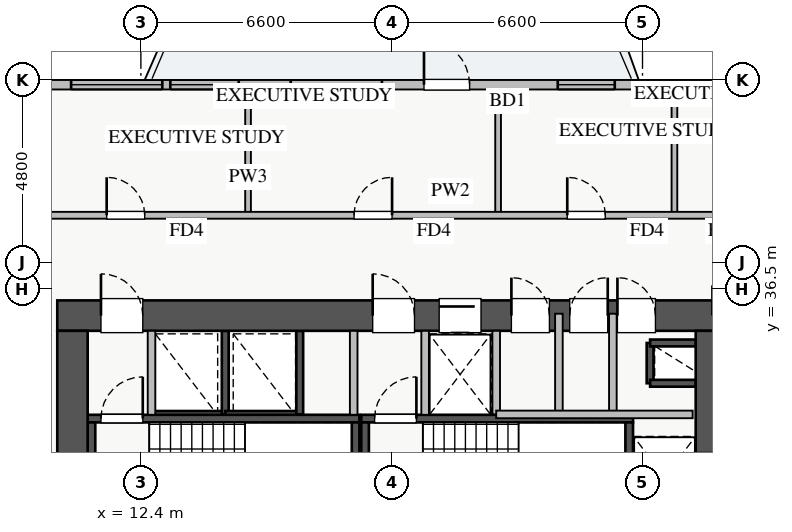
"""IFC4 building model, lengths in metres.
Left out: names, types, materials, properties, quantities, classifications, styles, units other than length and angle.
Written with IfcOpenShell. Run it as: python <this file> out.ifc"""

import sys

from ifc_helpers import new_model, si_unit, direction, frame, frame_2d, origin, place, context, subcontext, project, spatial, rectangle, extrude, source, transform, mapped, element, fill, save


model = new_model("IFC4")
c1 = context("Model", 3, precision=1e-05, world=origin(), true_north=direction((0.0, 1.0)))
c2 = subcontext(c1, "Body", "Model", "MODEL_VIEW")
j1 = project(units=[si_unit("LENGTHUNIT", "METRE"), si_unit("PLANEANGLEUNIT", "RADIAN")], contexts=[c1])
p1 = place(None, origin())
s1 = spatial("IfcSite", under=j1, at=p1, CompositionType="ELEMENT")
p2 = place(p1, origin())
s2 = spatial("IfcBuilding", under=s1, at=p2, CompositionType="ELEMENT")
p3 = place(p2, frame((0.0, 0.0, 73.0)))
s3 = spatial("IfcBuildingStorey", under=s2, at=p3, CompositionType="ELEMENT", Elevation=73.0)
p4 = place(p3, frame((12.68, 33.2, 0.0), z_axis=(0.0, 0.0, 1.0), x_axis=(1.0, 0.0, 0.0)))
e1 = element("IfcWall", 1, at=p4, inside=s3, PredefinedType="SHEAR", context=c2, shape_type="SweptSolid", body=[
    extrude(rectangle(XDim=1.94, YDim=0.18, at=frame_2d((0.97, 0.0))), origin(), (0.0, 0.0, 1.0), 3.07),
])
p5 = place(p3, frame((14.62, 33.2, 0.0), z_axis=(0.0, 0.0, 1.0), x_axis=(0.0, 1.0, 0.0)))
e2 = element("IfcWall", 2, at=p5, inside=s3, PredefinedType="SHEAR", context=c2, shape_type="SweptSolid", body=[
    extrude(rectangle(XDim=2.2, YDim=0.18, at=frame_2d((1.1, 0.0))), origin(), (0.0, 0.0, 1.0), 3.07),
])
p6 = place(p3, frame((25.8, 34.02, 0.0), z_axis=(0.0, 0.0, 1.0), x_axis=(0.0, 1.0, 0.0)))
e3 = element("IfcWall", 3, at=p6, inside=s3, PredefinedType="SHEAR", context=c2, shape_type="SweptSolid", body=[
    extrude(rectangle(XDim=1.06, YDim=0.18, at=frame_2d((0.53, 0.0))), origin(), (0.0, 0.0, 1.0), 3.07),
])
for number, where, z_axis, x_axis in (
    (4, (25.8, 35.08, 0.0), (0.0, 0.0, 1.0), (1.0, 0.0, 0.0)),
    (5, (25.8, 34.02, 0.0), (0.0, 0.0, 1.0), (1.0, 0.0, 0.0)),
):
    element("IfcWall", number, at=place(p3, frame(where, z_axis=z_axis, x_axis=x_axis)), inside=s3, PredefinedType="SHEAR", context=c2, shape_type="SweptSolid", body=[
        extrude(rectangle(XDim=1.2, YDim=0.18, at=frame_2d((0.6, 0.0))), origin(), (0.0, 0.0, 1.0), 3.07),
    ])
p7 = place(p3, frame((14.62, 33.2, 0.0), z_axis=(0.0, 0.0, 1.0), x_axis=(1.0, 0.0, 0.0)))
e6 = element("IfcWall", 6, at=p7, inside=s3, PredefinedType="SHEAR", context=c2, shape_type="SweptSolid", body=[
    extrude(rectangle(XDim=1.96, YDim=0.18, at=frame_2d((0.98, 0.0))), origin(), (0.0, 0.0, 1.0), 3.07),
])
p8 = place(p3, frame((16.58, 33.2, 0.0), z_axis=(0.0, 0.0, 1.0), x_axis=(0.0, 1.0, 0.0)))
e7 = element("IfcWall", 7, at=p8, inside=s3, PredefinedType="SHEAR", context=c2, shape_type="SweptSolid", body=[
    extrude(rectangle(XDim=2.2, YDim=0.18, at=frame_2d((1.1, 0.0))), origin(), (0.0, 0.0, 1.0), 3.07),
])
p9 = place(p3, frame((19.88, 33.2, 0.0), z_axis=(0.0, 0.0, 1.0), x_axis=(1.0, 0.0, 0.0)))
e8 = element("IfcWall", 8, at=p9, inside=s3, PredefinedType="SHEAR", context=c2, shape_type="SweptSolid", body=[
    extrude(rectangle(XDim=1.87, YDim=0.18, at=frame_2d((0.935, 0.0))), origin(), (0.0, 0.0, 1.0), 3.07),
])
p10 = place(p3, frame((11.0, 33.09, 0.0), z_axis=(0.0, 0.0, 1.0), x_axis=(1.0, 0.0, 0.0)))
e9 = element("IfcWall", 9, at=p10, inside=s3, PredefinedType="SHEAR", context=c2, shape_type="SweptSolid", body=[
    extrude(rectangle(XDim=7.15, YDim=0.2, at=frame_2d((3.575, 0.0))), origin(), (0.0, 0.0, 1.0), 3.25),
])
p11 = place(p10, frame((0.35, 0.0, 0.0)))
e10 = element("IfcOpeningElement", 10, at=p11, cuts=e9, PredefinedType="OPENING", context=c2, shape_type="SweptSolid", body=[
    extrude(rectangle(XDim=1.1, YDim=2.05, at=frame_2d((0.55, 1.025))), frame((0.0, 0.11, 0.0), z_axis=(0.0, -1.0, 0.0), x_axis=(1.0, 0.0, 0.0)), (0.0, 0.0, 1.0), 0.22),
])
for number, where, z_axis, x_axis in (
    (11, (11.1, 30.05, 0.0), (0.0, 0.0, 1.0), (0.0, 1.0, 0.0)),
    (12, (18.05, 30.05, 0.0), (0.0, 0.0, 1.0), (0.0, 1.0, 0.0)),
):
    element("IfcWall", number, at=place(p3, frame(where, z_axis=z_axis, x_axis=x_axis)), inside=s3, PredefinedType="SHEAR", context=c2, shape_type="SweptSolid", body=[
        extrude(rectangle(XDim=2.94, YDim=0.2, at=frame_2d((1.47, 0.0))), origin(), (0.0, 0.0, 1.0), 3.25),
    ])
p12 = place(p3, frame((18.2, 33.09, 0.0), z_axis=(0.0, 0.0, 1.0), x_axis=(1.0, 0.0, 0.0)))
e13 = element("IfcWall", 13, at=p12, inside=s3, PredefinedType="SHEAR", context=c2, shape_type="SweptSolid", body=[
    extrude(rectangle(XDim=7.15, YDim=0.2, at=frame_2d((3.575, 0.0))), origin(), (0.0, 0.0, 1.0), 3.25),
])
p13 = place(p12, frame((0.35, 0.0, 0.0)))
e14 = element("IfcOpeningElement", 14, at=p13, cuts=e13, PredefinedType="OPENING", context=c2, shape_type="SweptSolid", body=[
    extrude(rectangle(XDim=1.1, YDim=2.05, at=frame_2d((0.55, 1.025))), frame((0.0, 0.11, 0.0), z_axis=(0.0, -1.0, 0.0), x_axis=(1.0, 0.0, 0.0)), (0.0, 0.0, 1.0), 0.22),
])
for number, where, z_axis, x_axis in (
    (15, (18.3, 30.05, 0.0), (0.0, 0.0, 1.0), (0.0, 1.0, 0.0)),
    (16, (25.25, 30.05, 0.0), (0.0, 0.0, 1.0), (0.0, 1.0, 0.0)),
):
    element("IfcWall", number, at=place(p3, frame(where, z_axis=z_axis, x_axis=x_axis)), inside=s3, PredefinedType="SHEAR", context=c2, shape_type="SweptSolid", body=[
        extrude(rectangle(XDim=2.94, YDim=0.2, at=frame_2d((1.47, 0.0))), origin(), (0.0, 0.0, 1.0), 3.25),
    ])
p14 = place(p3, frame((10.2, 35.8, 0.0), z_axis=(0.0, 0.0, 1.0), x_axis=(1.0, 0.0, 0.0)))
e17 = element("IfcWall", 17, at=p14, inside=s3, PredefinedType="SHEAR", context=c2, shape_type="SweptSolid", body=[
    extrude(rectangle(XDim=17.6, YDim=0.8, at=frame_2d((8.8, 0.0))), origin(), (0.0, 0.0, 1.0), 3.25),
])
p15 = place(p14, frame((1.15, 0.0, 0.0)))
e18 = element("IfcOpeningElement", 18, at=p15, cuts=e17, PredefinedType="OPENING", context=c2, shape_type="SweptSolid", body=[
    extrude(rectangle(XDim=1.1, YDim=2.05, at=frame_2d((0.55, 1.025))), frame((0.0, 0.41, 0.0), z_axis=(0.0, -1.0, 0.0), x_axis=(1.0, 0.0, 0.0)), (0.0, 0.0, 1.0), 0.82),
])
p16 = place(p14, frame((8.3, 0.0, 0.0)))
e19 = element("IfcOpeningElement", 19, at=p16, cuts=e17, PredefinedType="OPENING", context=c2, shape_type="SweptSolid", body=[
    extrude(rectangle(XDim=1.1, YDim=2.05, at=frame_2d((0.55, 1.025))), frame((0.0, 0.41, 0.0), z_axis=(0.0, -1.0, 0.0), x_axis=(1.0, 0.0, 0.0)), (0.0, 0.0, 1.0), 0.82),
])
p17 = place(p14, frame((10.05, 0.0, 0.0)))
e20 = element("IfcOpeningElement", 20, at=p17, cuts=e17, PredefinedType="OPENING", context=c2, shape_type="SweptSolid", body=[
    extrude(rectangle(XDim=1.1, YDim=2.05, at=frame_2d((0.55, 1.025))), frame((0.0, 0.41, 0.0), z_axis=(0.0, -1.0, 0.0), x_axis=(1.0, 0.0, 0.0)), (0.0, 0.0, 1.0), 0.82),
])
p18 = place(p14, frame((14.74, 0.0, 0.0)))
e21 = element("IfcOpeningElement", 21, at=p18, cuts=e17, PredefinedType="OPENING", context=c2, shape_type="SweptSolid", body=[
    extrude(rectangle(XDim=1.0, YDim=2.05, at=frame_2d((0.5, 1.025))), frame((0.0, 0.41, 0.0), z_axis=(0.0, -1.0, 0.0), x_axis=(1.0, 0.0, 0.0)), (0.0, 0.0, 1.0), 0.82),
])
p19 = place(p14, frame((11.95, 0.0, 0.0)))
e22 = element("IfcOpeningElement", 22, at=p19, cuts=e17, PredefinedType="OPENING", context=c2, shape_type="SweptSolid", body=[
    extrude(rectangle(XDim=1.0, YDim=2.05, at=frame_2d((0.5, 1.025))), frame((0.0, 0.41, 0.0), z_axis=(0.0, -1.0, 0.0), x_axis=(1.0, 0.0, 0.0)), (0.0, 0.0, 1.0), 0.82),
])
p20 = place(p14, frame((13.485, 0.0, 0.0)))
e23 = element("IfcOpeningElement", 23, at=p20, cuts=e17, PredefinedType="OPENING", context=c2, shape_type="SweptSolid", body=[
    extrude(rectangle(XDim=1.0, YDim=2.05, at=frame_2d((0.5, 1.025))), frame((0.0, 0.41, 0.0), z_axis=(0.0, -1.0, 0.0), x_axis=(1.0, 0.0, 0.0)), (0.0, 0.0, 1.0), 0.82),
])
p21 = place(p3, frame((10.6, 29.8, 0.0), z_axis=(0.0, 0.0, 1.0), x_axis=(0.0, 1.0, 0.0)))
e24 = element("IfcWall", 24, at=p21, inside=s3, PredefinedType="SHEAR", context=c2, shape_type="SweptSolid", body=[
    extrude(rectangle(XDim=5.6, YDim=0.8, at=frame_2d((2.8, 0.0))), origin(), (0.0, 0.0, 1.0), 3.25),
])
p22 = place(p3, frame((27.4, 29.8, 0.0), z_axis=(0.0, 0.0, 1.0), x_axis=(0.0, 1.0, 0.0)))
e25 = element("IfcWall", 25, at=p22, inside=s3, PredefinedType="SHEAR", context=c2, shape_type="SweptSolid", body=[
    extrude(rectangle(XDim=5.6, YDim=0.8, at=frame_2d((2.8, 0.0))), origin(), (0.0, 0.0, 1.0), 3.25),
])
p23 = place(p22, frame((1.1, 0.0, 0.0)))
e26 = element("IfcOpeningElement", 26, at=p23, cuts=e25, PredefinedType="OPENING", context=c2, shape_type="SweptSolid", body=[
    extrude(rectangle(XDim=1.3, YDim=2.05, at=frame_2d((0.65, 1.025))), frame((0.0, 0.41, 0.0), z_axis=(0.0, -1.0, 0.0), x_axis=(1.0, 0.0, 0.0)), (0.0, 0.0, 1.0), 0.82),
])
p24 = place(p3, frame((5.45, 41.875, 0.0), z_axis=(0.0, 0.0, 1.0), x_axis=(1.0, 0.0, 0.0)))
e27 = element("IfcWall", 27, at=p24, inside=s3, PredefinedType="STANDARD", context=c2, shape_type="SweptSolid", body=[
    extrude(rectangle(XDim=27.1, YDim=0.25, at=frame_2d((13.55, 0.0))), origin(), (0.0, 0.0, 1.0), 2.61),
])
p25 = place(p24, frame((14.4, 0.0, 0.0)))
e28 = element("IfcOpeningElement", 28, at=p25, cuts=e27, PredefinedType="OPENING", context=c2, shape_type="SweptSolid", body=[
    extrude(rectangle(XDim=1.2, YDim=2.1, at=frame_2d((0.6, 1.05))), frame((0.0, 0.135, 0.0), z_axis=(0.0, -1.0, 0.0), x_axis=(1.0, 0.0, 0.0)), (0.0, 0.0, 1.0), 0.27),
])
p26 = place(p24, frame((1.48, 0.0, 0.9)))
e29 = element("IfcOpeningElement", 29, at=p26, cuts=e27, PredefinedType="OPENING", context=c2, shape_type="SweptSolid", body=[
    extrude(rectangle(XDim=1.5, YDim=1.5, at=frame_2d((0.75, 0.75))), frame((0.0, 0.135, 0.0), z_axis=(0.0, -1.0, 0.0), x_axis=(1.0, 0.0, 0.0)), (0.0, 0.0, 1.0), 0.27),
])
p27 = place(p24, frame((7.725, 0.0, 0.9)))
e30 = element("IfcOpeningElement", 30, at=p27, cuts=e27, PredefinedType="OPENING", context=c2, shape_type="SweptSolid", body=[
    extrude(rectangle(XDim=1.8, YDim=1.5, at=frame_2d((0.9, 0.75))), frame((0.0, 0.135, 0.0), z_axis=(0.0, -1.0, 0.0), x_axis=(1.0, 0.0, 0.0)), (0.0, 0.0, 1.0), 0.27),
])
p28 = place(p24, frame((17.92, 0.0, 0.9)))
e31 = element("IfcOpeningElement", 31, at=p28, cuts=e27, PredefinedType="OPENING", context=c2, shape_type="SweptSolid", body=[
    extrude(rectangle(XDim=1.5, YDim=1.5, at=frame_2d((0.75, 0.75))), frame((0.0, 0.135, 0.0), z_axis=(0.0, -1.0, 0.0), x_axis=(1.0, 0.0, 0.0)), (0.0, 0.0, 1.0), 0.27),
])
p29 = place(p24, frame((22.663, 0.0, 0.9)))
e32 = element("IfcOpeningElement", 32, at=p29, cuts=e27, PredefinedType="OPENING", context=c2, shape_type="SweptSolid", body=[
    extrude(rectangle(XDim=2.1, YDim=1.48, at=frame_2d((1.05, 0.74))), frame((0.0, 0.135, 0.0), z_axis=(0.0, -1.0, 0.0), x_axis=(1.0, 0.0, 0.0)), (0.0, 0.0, 1.0), 0.27),
])
p30 = place(p24, frame((5.114, 0.0, 0.9)))
e33 = element("IfcOpeningElement", 33, at=p30, cuts=e27, PredefinedType="OPENING", context=c2, shape_type="SweptSolid", body=[
    extrude(rectangle(XDim=2.4, YDim=1.5, at=frame_2d((1.2, 0.75))), frame((0.0, 0.135, 0.0), z_axis=(0.0, -1.0, 0.0), x_axis=(1.0, 0.0, 0.0)), (0.0, 0.0, 1.0), 0.27),
])
p31 = place(p24, frame((10.893, 0.0, 0.9)))
e34 = element("IfcOpeningElement", 34, at=p31, cuts=e27, PredefinedType="OPENING", context=c2, shape_type="SweptSolid", body=[
    extrude(rectangle(XDim=2.4, YDim=1.5, at=frame_2d((1.2, 0.75))), frame((0.0, 0.135, 0.0), z_axis=(0.0, -1.0, 0.0), x_axis=(1.0, 0.0, 0.0)), (0.0, 0.0, 1.0), 0.27),
])
for number, where, z_axis, x_axis in (
    (35, (12.68, 33.19, 0.0), (0.0, 0.0, 1.0), (0.0, 1.0, 0.0)),
    (36, (18.0, 33.19, 0.0), (0.0, 0.0, 1.0), (0.0, 1.0, 0.0)),
    (37, (19.88, 33.19, 0.0), (0.0, 0.0, 1.0), (0.0, 1.0, 0.0)),
):
    element("IfcWall", number, at=place(p3, frame(where, z_axis=z_axis, x_axis=x_axis)), inside=s3, PredefinedType="PARTITIONING", context=c2, shape_type="SweptSolid", body=[
        extrude(rectangle(XDim=2.21, YDim=0.2, at=frame_2d((1.105, 0.0))), origin(), (0.0, 0.0, 1.0), 3.07),
    ])
p32 = place(p3, frame((24.82, 33.2, 0.0), z_axis=(0.0, 0.0, 1.0), x_axis=(0.0, 1.0, 0.0)))
e38 = element("IfcWall", 38, at=p32, inside=s3, PredefinedType="PARTITIONING", context=c2, shape_type="SweptSolid", body=[
    extrude(rectangle(XDim=2.65, YDim=0.2, at=frame_2d((1.325, 0.0))), origin(), (0.0, 0.0, 1.0), 3.07),
])
p33 = place(p3, frame((21.75, 33.2, 0.0), z_axis=(0.0, 0.0, 1.0), x_axis=(0.0, 1.0, 0.0)))
e39 = element("IfcWall", 39, at=p33, inside=s3, PredefinedType="PARTITIONING", context=c2, shape_type="SweptSolid", body=[
    extrude(rectangle(XDim=2.2, YDim=0.2, at=frame_2d((1.1, 0.0))), origin(), (0.0, 0.0, 1.0), 3.07),
])
p34 = place(p3, frame((23.4, 33.2, 0.0), z_axis=(0.0, 0.0, 1.0), x_axis=(0.0, 1.0, 0.0)))
e40 = element("IfcWall", 40, at=p34, inside=s3, PredefinedType="PARTITIONING", context=c2, shape_type="SweptSolid", body=[
    extrude(rectangle(XDim=2.65, YDim=0.2, at=frame_2d((1.325, 0.0))), origin(), (0.0, 0.0, 1.0), 3.07),
])
p35 = place(p3, frame((21.75, 33.2, 0.0), z_axis=(0.0, 0.0, 1.0), x_axis=(1.0, 0.0, 0.0)))
e41 = element("IfcWall", 41, at=p35, inside=s3, PredefinedType="PARTITIONING", context=c2, shape_type="SweptSolid", body=[
    extrude(rectangle(XDim=5.17, YDim=0.2, at=frame_2d((2.585, 0.0))), origin(), (0.0, 0.0, 1.0), 3.07),
])
for number, where, z_axis, x_axis in (
    (42, (15.22, 38.44, 0.0), (0.0, 0.0, 1.0), (0.0, 1.0, 0.0)),
    (43, (21.8, 38.44, 0.0), (0.0, 0.0, 1.0), (0.0, 1.0, 0.0)),
    (44, (26.44, 38.44, 0.0), (0.0, 0.0, 1.0), (0.0, 1.0, 0.0)),
):
    element("IfcWall", number, at=place(p3, frame(where, z_axis=z_axis, x_axis=x_axis)), inside=s3, PredefinedType="PARTITIONING", context=c2, shape_type="SweptSolid", body=[
        extrude(rectangle(XDim=3.31, YDim=0.15, at=frame_2d((1.655, 0.0))), origin(), (0.0, 0.0, 1.0), 3.07),
    ])
p36 = place(p3, frame((8.78, 38.44, 0.0), z_axis=(0.0, 0.0, 1.0), x_axis=(1.0, 0.0, 0.0)))
e45 = element("IfcWall", 45, at=p36, inside=s3, PredefinedType="PARTITIONING", context=c2, shape_type="SweptSolid", body=[
    extrude(rectangle(XDim=23.54, YDim=0.18, at=frame_2d((11.77, 0.0))), origin(), (0.0, 0.0, 1.0), 3.07),
])
p37 = place(p36, frame((2.72, 0.0, 0.0)))
e46 = element("IfcOpeningElement", 46, at=p37, cuts=e45, PredefinedType="OPENING", context=c2, shape_type="SweptSolid", body=[
    extrude(rectangle(XDim=1.0, YDim=2.05, at=frame_2d((0.5, 1.025))), frame((0.0, 0.1, 0.0), z_axis=(0.0, -1.0, 0.0), x_axis=(1.0, 0.0, 0.0)), (0.0, 0.0, 1.0), 0.2),
])
p38 = place(p36, frame((9.23, 0.0, 0.0)))
e47 = element("IfcOpeningElement", 47, at=p38, cuts=e45, PredefinedType="OPENING", context=c2, shape_type="SweptSolid", body=[
    extrude(rectangle(XDim=1.0, YDim=2.05, at=frame_2d((0.5, 1.025))), frame((0.0, 0.1, 0.0), z_axis=(0.0, -1.0, 0.0), x_axis=(1.0, 0.0, 0.0)), (0.0, 0.0, 1.0), 0.2),
])
p39 = place(p36, frame((14.84, 0.0, 0.0)))
e48 = element("IfcOpeningElement", 48, at=p39, cuts=e45, PredefinedType="OPENING", context=c2, shape_type="SweptSolid", body=[
    extrude(rectangle(XDim=1.0, YDim=2.05, at=frame_2d((0.5, 1.025))), frame((0.0, 0.1, 0.0), z_axis=(0.0, -1.0, 0.0), x_axis=(1.0, 0.0, 0.0)), (0.0, 0.0, 1.0), 0.2),
])
p40 = place(p36, frame((20.1, 0.0, 0.0)))
e49 = element("IfcOpeningElement", 49, at=p40, cuts=e45, PredefinedType="OPENING", context=c2, shape_type="SweptSolid", body=[
    extrude(rectangle(XDim=1.0, YDim=2.05, at=frame_2d((0.5, 1.025))), frame((0.0, 0.1, 0.0), z_axis=(0.0, -1.0, 0.0), x_axis=(1.0, 0.0, 0.0)), (0.0, 0.0, 1.0), 0.2),
])
m1 = source(origin(), c2, "Body", "SweptSolid", [
    extrude(rectangle(XDim=1.2, YDim=2.1, at=frame_2d((0.6, 1.05))), frame((0.0, 0.025, 0.0), z_axis=(0.0, -1.0, 0.0), x_axis=(1.0, 0.0, 0.0)), (0.0, 0.0, 1.0), 0.05),
])
p41 = place(p25, origin())
e50 = element("IfcDoor", 50, at=p41, inside=s3, OperationType="SINGLE_SWING_LEFT", PredefinedType="DOOR", context=c2, shape_type="MappedRepresentation", body=[
    mapped(m1, transform((0.0, 0.0, 0.0), x_axis=(1.0, 0.0, 0.0), y_axis=(0.0, 1.0, 0.0), z_axis=(0.0, 0.0, 1.0), scale=1.0)),
])
fill(e28, e50)
m2 = source(origin(), c2, "Body", "SweptSolid", [
    extrude(rectangle(XDim=1.8, YDim=1.5, at=frame_2d((0.9, 0.75))), frame((0.0, 0.03, 0.0), z_axis=(0.0, -1.0, 0.0), x_axis=(1.0, 0.0, 0.0)), (0.0, 0.0, 1.0), 0.06),
])
p42 = place(p27, origin())
e51 = element("IfcWindow", 51, at=p42, inside=s3, PartitioningType="DOUBLE_PANEL_VERTICAL", PredefinedType="WINDOW", context=c2, shape_type="MappedRepresentation", body=[
    mapped(m2, transform((0.0, 0.0, 0.0), x_axis=(1.0, 0.0, 0.0), y_axis=(0.0, 1.0, 0.0), z_axis=(0.0, 0.0, 1.0), scale=1.0)),
])
fill(e30, e51)
m3 = source(origin(), c2, "Body", "SweptSolid", [
    extrude(rectangle(XDim=1.5, YDim=1.5, at=frame_2d((0.75, 0.75))), frame((0.0, 0.03, 0.0), z_axis=(0.0, -1.0, 0.0), x_axis=(1.0, 0.0, 0.0)), (0.0, 0.0, 1.0), 0.06),
])
p43 = place(p28, origin())
e52 = element("IfcWindow", 52, at=p43, inside=s3, PartitioningType="DOUBLE_PANEL_VERTICAL", PredefinedType="WINDOW", context=c2, shape_type="MappedRepresentation", body=[
    mapped(m3, transform((0.0, 0.0, 0.0), x_axis=(1.0, 0.0, 0.0), y_axis=(0.0, 1.0, 0.0), z_axis=(0.0, 0.0, 1.0), scale=1.0)),
])
fill(e31, e52)
m4 = source(origin(), c2, "Body", "SweptSolid", [
    extrude(rectangle(XDim=1.3, YDim=2.05, at=frame_2d((0.65, 1.025))), frame((0.0, 0.025, 0.0), z_axis=(0.0, -1.0, 0.0), x_axis=(1.0, 0.0, 0.0)), (0.0, 0.0, 1.0), 0.05),
])
p44 = place(p23, origin())
e53 = element("IfcDoor", 53, at=p44, inside=s3, OperationType="SLIDING_TO_LEFT", PredefinedType="DOOR", context=c2, shape_type="MappedRepresentation", body=[
    mapped(m4, transform((0.0, 0.0, 0.0), x_axis=(1.0, 0.0, 0.0), y_axis=(0.0, 1.0, 0.0), z_axis=(0.0, 0.0, 1.0), scale=1.0)),
])
fill(e26, e53)
m5 = source(origin(), c2, "Body", "SweptSolid", [
    extrude(rectangle(XDim=1.1, YDim=2.05, at=frame_2d((0.55, 1.025))), frame((0.0, 0.025, 0.0), z_axis=(0.0, -1.0, 0.0), x_axis=(1.0, 0.0, 0.0)), (0.0, 0.0, 1.0), 0.05),
])
p45 = place(p15, origin())
e54 = element("IfcDoor", 54, at=p45, inside=s3, OperationType="SINGLE_SWING_LEFT", PredefinedType="DOOR", context=c2, shape_type="MappedRepresentation", body=[
    mapped(m5, transform((0.0, 0.0, 0.0), x_axis=(1.0, 0.0, 0.0), y_axis=(0.0, 1.0, 0.0), z_axis=(0.0, 0.0, 1.0), scale=1.0)),
])
fill(e18, e54)
p46 = place(p11, origin())
e55 = element("IfcDoor", 55, at=p46, inside=s3, OperationType="SINGLE_SWING_RIGHT", PredefinedType="DOOR", context=c2, shape_type="MappedRepresentation", body=[
    mapped(m5, transform((0.0, 0.0, 0.0), x_axis=(1.0, 0.0, 0.0), y_axis=(0.0, 1.0, 0.0), z_axis=(0.0, 0.0, 1.0), scale=1.0)),
])
fill(e10, e55)
p47 = place(p16, origin())
e56 = element("IfcDoor", 56, at=p47, inside=s3, OperationType="SINGLE_SWING_LEFT", PredefinedType="DOOR", context=c2, shape_type="MappedRepresentation", body=[
    mapped(m5, transform((0.0, 0.0, 0.0), x_axis=(1.0, 0.0, 0.0), y_axis=(0.0, 1.0, 0.0), z_axis=(0.0, 0.0, 1.0), scale=1.0)),
])
fill(e19, e56)
p48 = place(p13, origin())
e57 = element("IfcDoor", 57, at=p48, inside=s3, OperationType="SINGLE_SWING_RIGHT", PredefinedType="DOOR", context=c2, shape_type="MappedRepresentation", body=[
    mapped(m5, transform((0.0, 0.0, 0.0), x_axis=(1.0, 0.0, 0.0), y_axis=(0.0, 1.0, 0.0), z_axis=(0.0, 0.0, 1.0), scale=1.0)),
])
fill(e14, e57)
p49 = place(p17, origin())
e58 = element("IfcDoor", 58, at=p49, inside=s3, OperationType="SLIDING_TO_LEFT", PredefinedType="DOOR", context=c2, shape_type="MappedRepresentation", body=[
    mapped(m5, transform((0.0, 0.0, 0.0), x_axis=(1.0, 0.0, 0.0), y_axis=(0.0, 1.0, 0.0), z_axis=(0.0, 0.0, 1.0), scale=1.0)),
])
fill(e20, e58)
m6 = source(origin(), c2, "Body", "SweptSolid", [
    extrude(rectangle(XDim=1.0, YDim=2.05, at=frame_2d((0.5, 1.025))), frame((0.0, 0.025, 0.0), z_axis=(0.0, -1.0, 0.0), x_axis=(1.0, 0.0, 0.0)), (0.0, 0.0, 1.0), 0.05),
])
p50 = place(p18, origin())
e59 = element("IfcDoor", 59, at=p50, inside=s3, OperationType="SINGLE_SWING_LEFT", PredefinedType="DOOR", context=c2, shape_type="MappedRepresentation", body=[
    mapped(m6, transform((0.0, 0.0, 0.0), x_axis=(1.0, 0.0, 0.0), y_axis=(0.0, 1.0, 0.0), z_axis=(0.0, 0.0, 1.0), scale=1.0)),
])
fill(e21, e59)
p51 = place(p19, origin())
e60 = element("IfcDoor", 60, at=p51, inside=s3, OperationType="SINGLE_SWING_LEFT", PredefinedType="DOOR", context=c2, shape_type="MappedRepresentation", body=[
    mapped(m6, transform((0.0, 0.0, 0.0), x_axis=(1.0, 0.0, 0.0), y_axis=(0.0, 1.0, 0.0), z_axis=(0.0, 0.0, 1.0), scale=1.0)),
])
fill(e22, e60)
p52 = place(p20, origin())
e61 = element("IfcDoor", 61, at=p52, inside=s3, OperationType="SINGLE_SWING_RIGHT", PredefinedType="DOOR", context=c2, shape_type="MappedRepresentation", body=[
    mapped(m6, transform((0.0, 0.0, 0.0), x_axis=(1.0, 0.0, 0.0), y_axis=(0.0, 1.0, 0.0), z_axis=(0.0, 0.0, 1.0), scale=1.0)),
])
fill(e23, e61)
p53 = place(p37, origin())
e62 = element("IfcDoor", 62, at=p53, inside=s3, OperationType="SINGLE_SWING_LEFT", PredefinedType="DOOR", context=c2, shape_type="MappedRepresentation", body=[
    mapped(m6, transform((0.0, 0.0, 0.0), x_axis=(1.0, 0.0, 0.0), y_axis=(0.0, 1.0, 0.0), z_axis=(0.0, 0.0, 1.0), scale=1.0)),
])
fill(e46, e62)
p54 = place(p38, origin())
e63 = element("IfcDoor", 63, at=p54, inside=s3, OperationType="SINGLE_SWING_RIGHT", PredefinedType="DOOR", context=c2, shape_type="MappedRepresentation", body=[
    mapped(m6, transform((0.0, 0.0, 0.0), x_axis=(1.0, 0.0, 0.0), y_axis=(0.0, 1.0, 0.0), z_axis=(0.0, 0.0, 1.0), scale=1.0)),
])
fill(e47, e63)
p55 = place(p39, origin())
e64 = element("IfcDoor", 64, at=p55, inside=s3, OperationType="SINGLE_SWING_LEFT", PredefinedType="DOOR", context=c2, shape_type="MappedRepresentation", body=[
    mapped(m6, transform((0.0, 0.0, 0.0), x_axis=(1.0, 0.0, 0.0), y_axis=(0.0, 1.0, 0.0), z_axis=(0.0, 0.0, 1.0), scale=1.0)),
])
fill(e48, e64)
m7 = source(origin(), c2, "Body", "SweptSolid", [
    extrude(rectangle(XDim=2.4, YDim=1.5, at=frame_2d((1.2, 0.75))), frame((0.0, 0.03, 0.0), z_axis=(0.0, -1.0, 0.0), x_axis=(1.0, 0.0, 0.0)), (0.0, 0.0, 1.0), 0.06),
])
p56 = place(p30, origin())
e65 = element("IfcWindow", 65, at=p56, inside=s3, PartitioningType="TRIPLE_PANEL_VERTICAL", PredefinedType="WINDOW", context=c2, shape_type="MappedRepresentation", body=[
    mapped(m7, transform((0.0, 0.0, 0.0), x_axis=(1.0, 0.0, 0.0), y_axis=(0.0, 1.0, 0.0), z_axis=(0.0, 0.0, 1.0), scale=1.0)),
])
fill(e33, e65)
p57 = place(p31, origin())
e66 = element("IfcWindow", 66, at=p57, inside=s3, PartitioningType="TRIPLE_PANEL_VERTICAL", PredefinedType="WINDOW", context=c2, shape_type="MappedRepresentation", body=[
    mapped(m7, transform((0.0, 0.0, 0.0), x_axis=(1.0, 0.0, 0.0), y_axis=(0.0, 1.0, 0.0), z_axis=(0.0, 0.0, 1.0), scale=1.0)),
])
fill(e34, e66)
save(model, sys.argv[1])
